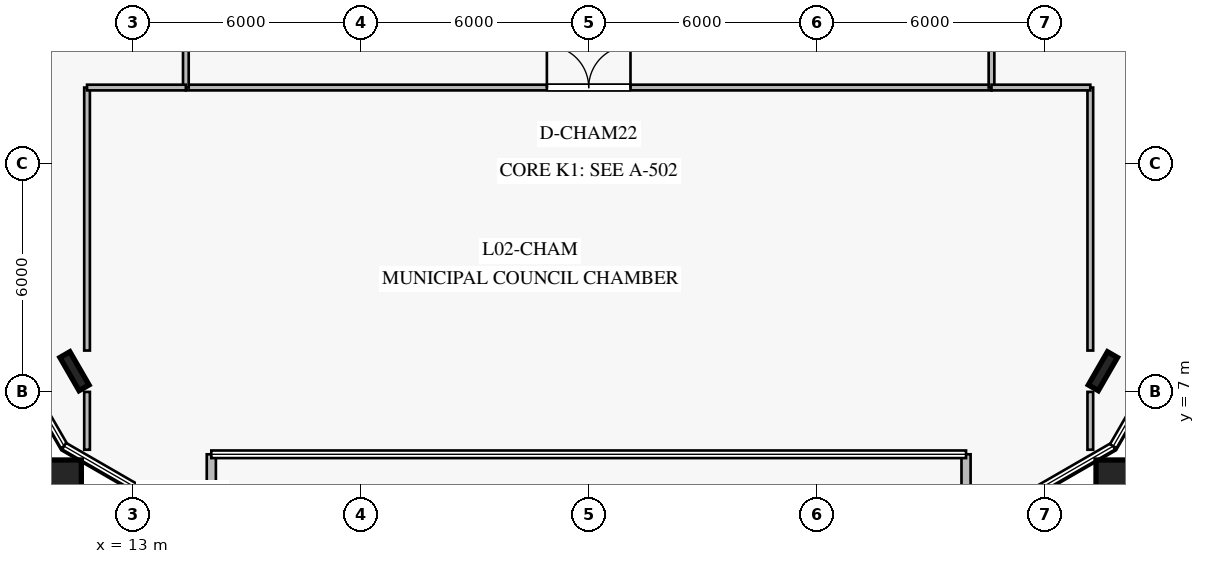
"""IFC4 building model, lengths in metres.
Left out: names, types, materials, properties, quantities, classifications, styles, units other than length and angle.
Written with IfcOpenShell. Run it as: python <this file> out.ifc"""

import sys

from ifc_helpers import new_model, si_unit, direction, frame, frame_2d, origin, origin_2d, place, context, subcontext, project, spatial, rectangle, i_section, extrude, element, fill, save


model = new_model("IFC4")
c1 = context("Model", 3, precision=1e-05, world=origin(), true_north=direction((0.0, 1.0)))
c2 = subcontext(c1, "Body", "Model", "MODEL_VIEW")
j1 = project(units=[si_unit("LENGTHUNIT", "METRE"), si_unit("PLANEANGLEUNIT", "RADIAN")], contexts=[c1])
p1 = place(None, origin())
s1 = spatial("IfcSite", under=j1, at=p1, CompositionType="ELEMENT")
p2 = place(p1, origin())
s2 = spatial("IfcBuilding", under=s1, at=p2, CompositionType="ELEMENT")
p3 = place(p2, frame((0.0, 0.0, 9.8)))
s3 = spatial("IfcBuildingStorey", under=s2, at=p3, CompositionType="ELEMENT", Elevation=9.8)
for number, where, z_axis, x_axis in (
    (1, (11.469, 7.536, 0.0), (0.0, 0.0, 1.0), (-0.5, 0.866, 0.0)),
    (2, (38.531, 7.536, 0.0), (0.0, 0.0, 1.0), (0.5, 0.866, 0.0)),
):
    element("IfcColumn", number, at=place(p3, frame(where, z_axis=z_axis, x_axis=x_axis)), inside=s3, PredefinedType="COLUMN", context=c2, shape_type="SweptSolid", body=[
        extrude(i_section(OverallWidth=0.302, OverallDepth=1.008, WebThickness=0.021, FlangeThickness=0.04, at=origin_2d()), origin(), (0.0, 0.0, 1.0), 4.6),
    ])
for number, where, z_axis, x_axis in (
    (3, (11.0, 4.55, 0.0), (0.0, 0.0, 1.0), (1.0, 0.0, 0.0)),
    (4, (39.0, 4.55, 0.0), (0.0, 0.0, 1.0), (1.0, 0.0, 0.0)),
):
    element("IfcColumn", number, at=place(p3, frame(where, z_axis=z_axis, x_axis=x_axis)), inside=s3, PredefinedType="COLUMN", context=c2, shape_type="SweptSolid", body=[
        extrude(rectangle(XDim=1.3, YDim=1.3, at=origin_2d()), origin(), (0.0, 0.0, 1.0), 4.6),
    ])
for number, where, z_axis, x_axis in (
    (5, (15.07, 3.327, 0.0), (0.0, 0.0, 1.0), (0.0, 1.0, 0.0)),
    (6, (34.93, 5.35, 0.0), (0.0, 0.0, 1.0), (0.0, -1.0, 0.0)),
):
    element("IfcWall", number, at=place(p3, frame(where, z_axis=z_axis, x_axis=x_axis)), inside=s3, PredefinedType="STANDARD", context=c2, shape_type="SweptSolid", body=[
        extrude(rectangle(XDim=2.023, YDim=0.24, at=frame_2d((1.012, 0.0))), origin(), (0.0, 0.0, 1.0), 4.34),
    ])
p4 = place(p3, frame((14.4, 15.0, 0.0), z_axis=(0.0, 0.0, 1.0), x_axis=(1.0, 0.0, 0.0)))
e7 = element("IfcWall", 7, at=p4, inside=s3, PredefinedType="PARTITIONING", context=c2, shape_type="SweptSolid", body=[
    extrude(rectangle(XDim=21.2, YDim=0.15, at=frame_2d((10.6, 0.0))), origin(), (0.0, 0.0, 1.0), 3.79),
])
p5 = place(p4, frame((9.5, 0.0, 0.0)))
e8 = element("IfcOpeningElement", 8, at=p5, cuts=e7, PredefinedType="OPENING", context=c2, shape_type="SweptSolid", body=[
    extrude(rectangle(XDim=2.2, YDim=2.4, at=frame_2d((1.1, 1.2))), frame((0.0, 0.085, 0.0), z_axis=(0.0, -1.0, 0.0), x_axis=(1.0, 0.0, 0.0)), (0.0, 0.0, 1.0), 0.17),
])
p6 = place(p3, frame((14.4, 15.0, 0.0), z_axis=(0.0, 0.0, 1.0), x_axis=(0.0, 1.0, 0.0)))
e9 = element("IfcWall", 9, at=p6, inside=s3, PredefinedType="PARTITIONING", context=c2, shape_type="SweptSolid", body=[
    extrude(rectangle(XDim=6.25, YDim=0.15, at=frame_2d((3.125, 0.0))), origin(), (0.0, 0.0, 1.0), 3.79),
])
p7 = place(p6, frame((2.486, 0.0, 0.0)))
e10 = element("IfcOpeningElement", 10, at=p7, cuts=e9, PredefinedType="OPENING", context=c2, shape_type="SweptSolid", body=[
    extrude(rectangle(XDim=1.1, YDim=2.2, at=frame_2d((0.55, 1.1))), frame((0.0, 0.085, 0.0), z_axis=(0.0, -1.0, 0.0), x_axis=(1.0, 0.0, 0.0)), (0.0, 0.0, 1.0), 0.17),
])
p8 = place(p3, frame((35.6, 15.0, 0.0), z_axis=(0.0, 0.0, 1.0), x_axis=(0.0, 1.0, 0.0)))
e11 = element("IfcWall", 11, at=p8, inside=s3, PredefinedType="PARTITIONING", context=c2, shape_type="SweptSolid", body=[
    extrude(rectangle(XDim=6.25, YDim=0.15, at=frame_2d((3.125, 0.0))), origin(), (0.0, 0.0, 1.0), 4.34),
])
p9 = place(p8, frame((2.486, 0.0, 0.0)))
e12 = element("IfcOpeningElement", 12, at=p9, cuts=e11, PredefinedType="OPENING", context=c2, shape_type="SweptSolid", body=[
    extrude(rectangle(XDim=1.1, YDim=2.2, at=frame_2d((0.55, 1.1))), frame((0.0, 0.085, 0.0), z_axis=(0.0, -1.0, 0.0), x_axis=(1.0, 0.0, 0.0)), (0.0, 0.0, 1.0), 0.17),
])
p10 = place(p3, frame((11.8, 5.47, 0.0), z_axis=(0.0, 0.0, 1.0), x_axis=(0.0, 1.0, 0.0)))
e13 = element("IfcWall", 13, at=p10, inside=s3, PredefinedType="PARTITIONING", context=c2, shape_type="SweptSolid", body=[
    extrude(rectangle(XDim=1.522, YDim=0.15, at=frame_2d((0.761, 0.0))), origin(), (0.0, 0.0, 1.0), 3.79),
])
p11 = place(p3, frame((11.8, 8.08, 0.0), z_axis=(0.0, 0.0, 1.0), x_axis=(0.0, 1.0, 0.0)))
e14 = element("IfcWall", 14, at=p11, inside=s3, PredefinedType="PARTITIONING", context=c2, shape_type="SweptSolid", body=[
    extrude(rectangle(XDim=6.92, YDim=0.15, at=frame_2d((3.46, 0.0))), origin(), (0.0, 0.0, 1.0), 3.79),
])
p12 = place(p3, frame((38.2, 5.47, 0.0), z_axis=(0.0, 0.0, 1.0), x_axis=(0.0, 1.0, 0.0)))
e15 = element("IfcWall", 15, at=p12, inside=s3, PredefinedType="PARTITIONING", context=c2, shape_type="SweptSolid", body=[
    extrude(rectangle(XDim=1.522, YDim=0.15, at=frame_2d((0.761, 0.0))), origin(), (0.0, 0.0, 1.0), 3.79),
])
p13 = place(p3, frame((38.2, 8.08, 0.0), z_axis=(0.0, 0.0, 1.0), x_axis=(0.0, 1.0, 0.0)))
e16 = element("IfcWall", 16, at=p13, inside=s3, PredefinedType="PARTITIONING", context=c2, shape_type="SweptSolid", body=[
    extrude(rectangle(XDim=6.92, YDim=0.15, at=frame_2d((3.46, 0.0))), origin(), (0.0, 0.0, 1.0), 3.79),
])
for number, where, z_axis, x_axis in (
    (17, (11.8, 15.0, 0.0), (0.0, 0.0, 1.0), (1.0, 0.0, 0.0)),
    (18, (35.6, 15.0, 0.0), (0.0, 0.0, 1.0), (1.0, 0.0, 0.0)),
):
    element("IfcWall", number, at=place(p3, frame(where, z_axis=z_axis, x_axis=x_axis)), inside=s3, PredefinedType="PARTITIONING", context=c2, shape_type="SweptSolid", body=[
        extrude(rectangle(XDim=2.6, YDim=0.15, at=frame_2d((1.3, 0.0))), origin(), (0.0, 0.0, 1.0), 4.34),
    ])
p14 = place(p5, origin())
e19 = element("IfcDoor", 19, at=p14, inside=s3, OperationType="DOUBLE_DOOR_SINGLE_SWING", PredefinedType="DOOR", context=c2, shape_type="SweptSolid", body=[
    extrude(rectangle(XDim=2.2, YDim=2.4, at=frame_2d((1.1, 1.2))), frame((0.0, 0.025, 0.0), z_axis=(0.0, -1.0, 0.0), x_axis=(1.0, 0.0, 0.0)), (0.0, 0.0, 1.0), 0.05),
])
fill(e8, e19)
save(model, sys.argv[1])
